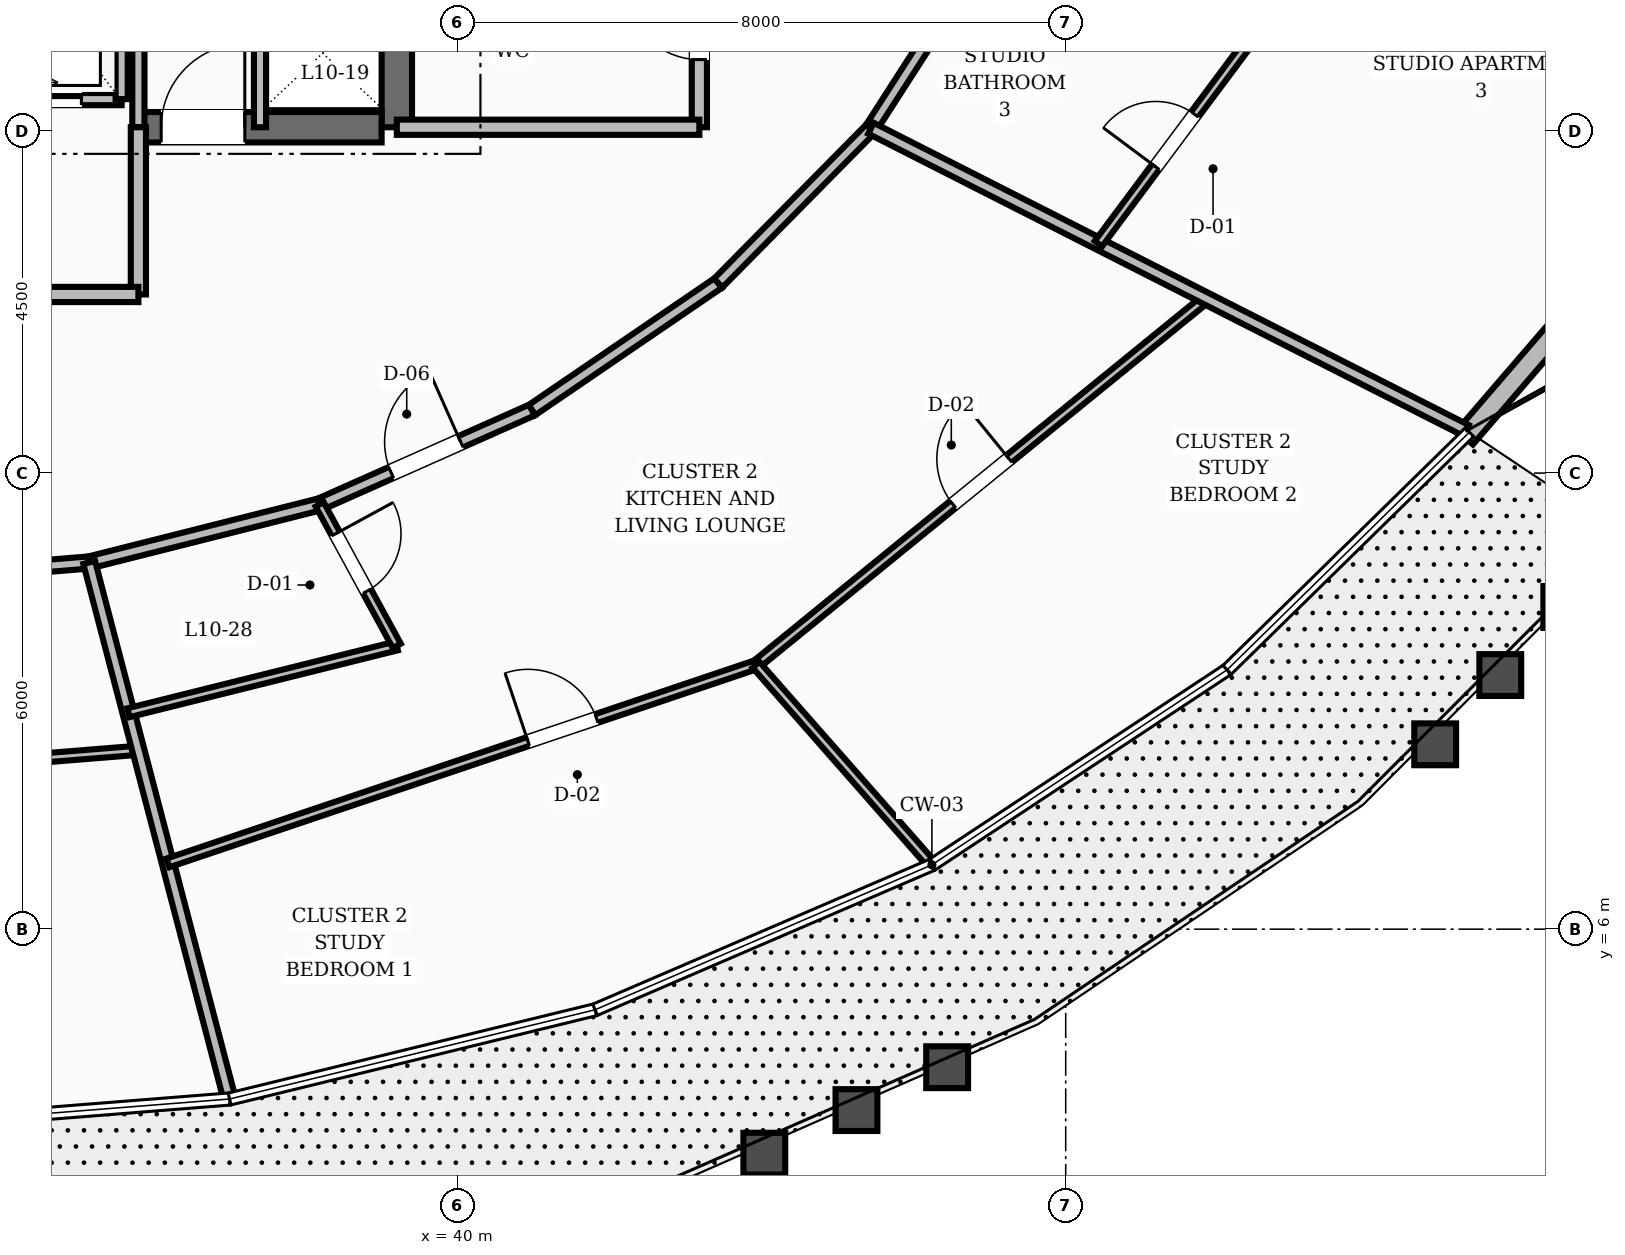
"""IFC4 building model, lengths in metres.
Left out: names, types, materials, properties, quantities, classifications, styles, units other than length and angle.
Written with IfcOpenShell. Run it as: python <this file> out.ifc"""

import sys

from ifc_helpers import new_model, si_unit, direction, frame, frame_2d, origin, place, context, subcontext, project, spatial, rectangle, extrude, element, fill, save


model = new_model("IFC4")
c1 = context("Model", 3, precision=1e-05, world=origin(), true_north=direction((0.0, 1.0)))
c2 = subcontext(c1, "Body", "Model", "MODEL_VIEW")
j1 = project(units=[si_unit("LENGTHUNIT", "METRE"), si_unit("PLANEANGLEUNIT", "RADIAN")], contexts=[c1])
p1 = place(None, origin())
s1 = spatial("IfcSite", under=j1, at=p1, CompositionType="ELEMENT")
p2 = place(p1, origin())
s2 = spatial("IfcBuilding", under=s1, at=p2, CompositionType="ELEMENT")
p3 = place(p2, frame((0.0, 0.0, 44.8)))
s3 = spatial("IfcBuildingStorey", under=s2, at=p3, CompositionType="ELEMENT", Elevation=44.8)
p4 = place(p3, frame((39.2, 16.55, 0.0), z_axis=(0.0, 0.0, 1.0), x_axis=(0.0, 1.0, 0.0)))
e1 = element("IfcWall", 1, at=p4, inside=s3, PredefinedType="SHEAR", context=c2, shape_type="SweptSolid", body=[
    extrude(rectangle(XDim=6.3, YDim=0.4, at=frame_2d((3.15, 0.0))), origin(), (0.0, 0.0, 1.0), 3.6),
])
p5 = place(p3, frame((35.8, 16.55, 0.0), z_axis=(0.0, 0.0, 1.0), x_axis=(1.0, 0.0, 0.0)))
e2 = element("IfcWall", 2, at=p5, inside=s3, PredefinedType="SHEAR", context=c2, shape_type="SweptSolid", body=[
    extrude(rectangle(XDim=3.2, YDim=0.4, at=frame_2d((1.6, 0.0))), origin(), (0.0, 0.0, 1.0), 3.6),
])
p6 = place(p5, frame((0.3, 0.0, 0.0)))
e3 = element("IfcOpeningElement", 3, at=p6, cuts=e2, PredefinedType="OPENING", context=c2, shape_type="SweptSolid", body=[
    extrude(rectangle(XDim=1.1, YDim=2.1, at=frame_2d((0.55, 1.05))), frame((0.0, 0.21, 0.0), z_axis=(0.0, -1.0, 0.0), x_axis=(1.0, 0.0, 0.0)), (0.0, 0.0, 1.0), 0.42),
])
p7 = place(p3, frame((53.251, 12.469, 0.0), z_axis=(0.0, 0.0, 1.0), x_axis=(0.652392900896, 0.757880929211, 0.0)))
e4 = element("IfcWall", 4, at=p7, inside=s3, PredefinedType="STANDARD", context=c2, shape_type="SweptSolid", body=[
    extrude(rectangle(XDim=4.515, YDim=0.28, at=frame_2d((2.258, 0.0))), origin(), (0.0, 0.0, 1.0), 2.65),
])
p8 = place(p3, frame((43.18, 16.55, 0.0), z_axis=(0.0, 0.0, 1.0), x_axis=(0.0, 1.0, 0.0)))
e5 = element("IfcWall", 5, at=p8, inside=s3, PredefinedType="SOLIDWALL", context=c2, shape_type="SweptSolid", body=[
    extrude(rectangle(XDim=2.73, YDim=0.2, at=frame_2d((1.365, 0.0))), origin(), (0.0, 0.0, 1.0), 2.61),
])
p9 = place(p8, frame((0.89, 0.0, 0.0)))
e6 = element("IfcOpeningElement", 6, at=p9, cuts=e5, PredefinedType="OPENING", context=c2, shape_type="SweptSolid", body=[
    extrude(rectangle(XDim=0.95, YDim=2.1, at=frame_2d((0.475, 1.05))), frame((0.0, 0.11, 0.0), z_axis=(0.0, -1.0, 0.0), x_axis=(1.0, 0.0, 0.0)), (0.0, 0.0, 1.0), 0.22),
])
p10 = place(p3, frame((39.2, 16.55, 0.0), z_axis=(0.0, 0.0, 1.0), x_axis=(1.0, 0.0, 0.0)))
e7 = element("IfcWall", 7, at=p10, inside=s3, PredefinedType="SOLIDWALL", context=c2, shape_type="SweptSolid", body=[
    extrude(rectangle(XDim=3.98, YDim=0.2, at=frame_2d((1.99, 0.0))), origin(), (0.0, 0.0, 1.0), 2.61),
])
p11 = place(p3, frame((35.8, 16.55, 0.0), z_axis=(0.0, 0.0, 1.0), x_axis=(0.0, 1.0, 0.0)))
e8 = element("IfcWall", 8, at=p11, inside=s3, PredefinedType="SOLIDWALL", context=c2, shape_type="SweptSolid", body=[
    extrude(rectangle(XDim=3.3, YDim=0.16, at=frame_2d((1.65, 0.0))), origin(), (0.0, 0.0, 1.0), 2.61),
])
p12 = place(p3, frame((37.4, 16.55, 0.0), z_axis=(0.0, 0.0, 1.0), x_axis=(0.0, 1.0, 0.0)))
e9 = element("IfcWall", 9, at=p12, inside=s3, PredefinedType="SOLIDWALL", context=c2, shape_type="SweptSolid", body=[
    extrude(rectangle(XDim=1.75, YDim=0.16, at=frame_2d((0.875, 0.0))), origin(), (0.0, 0.0, 1.0), 2.61),
])
p13 = place(p3, frame((35.8, 14.35, 0.0), z_axis=(0.0, 0.0, 1.0), x_axis=(0.0, 1.0, 0.0)))
e10 = element("IfcWall", 10, at=p13, inside=s3, PredefinedType="SOLIDWALL", context=c2, shape_type="SweptSolid", body=[
    extrude(rectangle(XDim=2.2, YDim=0.2, at=frame_2d((1.1, 0.0))), origin(), (0.0, 0.0, 1.0), 2.61),
])
p14 = place(p3, frame((28.2, 14.35, 0.0), z_axis=(0.0, 0.0, 1.0), x_axis=(1.0, 0.0, 0.0)))
e11 = element("IfcWall", 11, at=p14, inside=s3, PredefinedType="SOLIDWALL", context=c2, shape_type="SweptSolid", body=[
    extrude(rectangle(XDim=7.6, YDim=0.2, at=frame_2d((3.8, 0.0))), origin(), (0.0, 0.0, 1.0), 2.61),
])
p15 = place(p14, frame((3.2, 0.0, 0.0)))
e12 = element("IfcOpeningElement", 12, at=p15, cuts=e11, PredefinedType="OPENING", context=c2, shape_type="SweptSolid", body=[
    extrude(rectangle(XDim=1.2, YDim=2.1, at=frame_2d((0.6, 1.05))), frame((0.0, 0.11, 0.0), z_axis=(0.0, -1.0, 0.0), x_axis=(1.0, 0.0, 0.0)), (0.0, 0.0, 1.0), 0.22),
])
p16 = place(p3, frame((28.42, 16.92, 0.0), z_axis=(0.0, 0.0, 1.0), x_axis=(1.0, 0.0, 0.0)))
e13 = element("IfcWall", 13, at=p16, inside=s3, PredefinedType="SOLIDWALL", context=c2, shape_type="SweptSolid", body=[
    extrude(rectangle(XDim=7.16, YDim=0.16, at=frame_2d((3.58, 0.0))), origin(), (0.0, 0.0, 1.0), 2.61),
])
p17 = place(p16, frame((0.53, 0.0, 0.0)))
e14 = element("IfcOpeningElement", 14, at=p17, cuts=e13, PredefinedType="OPENING", context=c2, shape_type="SweptSolid", body=[
    extrude(rectangle(XDim=1.1, YDim=2.15, at=frame_2d((0.55, 1.075))), frame((0.0, 0.09, 0.0), z_axis=(0.0, -1.0, 0.0), x_axis=(1.0, 0.0, 0.0)), (0.0, 0.0, 1.0), 0.18),
])
p18 = place(p16, frame((3.03, 0.0, 0.0)))
e15 = element("IfcOpeningElement", 15, at=p18, cuts=e13, PredefinedType="OPENING", context=c2, shape_type="SweptSolid", body=[
    extrude(rectangle(XDim=1.1, YDim=2.15, at=frame_2d((0.55, 1.075))), frame((0.0, 0.09, 0.0), z_axis=(0.0, -1.0, 0.0), x_axis=(1.0, 0.0, 0.0)), (0.0, 0.0, 1.0), 0.18),
])
p19 = place(p16, frame((5.53, 0.0, 0.0)))
e16 = element("IfcOpeningElement", 16, at=p19, cuts=e13, PredefinedType="OPENING", context=c2, shape_type="SweptSolid", body=[
    extrude(rectangle(XDim=1.1, YDim=2.15, at=frame_2d((0.55, 1.075))), frame((0.0, 0.09, 0.0), z_axis=(0.0, -1.0, 0.0), x_axis=(1.0, 0.0, 0.0)), (0.0, 0.0, 1.0), 0.18),
])
p20 = place(p3, frame((35.58, 16.92, 0.0), z_axis=(0.0, 0.0, 1.0), x_axis=(0.0, 1.0, 0.0)))
e17 = element("IfcWall", 17, at=p20, inside=s3, PredefinedType="SOLIDWALL", context=c2, shape_type="SweptSolid", body=[
    extrude(rectangle(XDim=2.76, YDim=0.16, at=frame_2d((1.38, 0.0))), origin(), (0.0, 0.0, 1.0), 2.61),
])
p21 = place(p3, frame((32.0, 10.566, 0.0), z_axis=(0.0, 0.0, 1.0), x_axis=(0.996661331307, 0.081646743207, 0.0)))
e18 = element("IfcWall", 18, at=p21, inside=s3, PredefinedType="SOLIDWALL", context=c2, shape_type="SweptSolid", body=[
    extrude(rectangle(XDim=3.164, YDim=0.16, at=frame_2d((1.582, 0.0))), origin(), (0.0, 0.0, 1.0), 2.61),
])
p22 = place(p3, frame((35.153, 10.824, 0.0), z_axis=(0.0, 0.0, 1.0), x_axis=(0.969653665365, 0.244482656326, 0.0)))
e19 = element("IfcWall", 19, at=p22, inside=s3, PredefinedType="SOLIDWALL", context=c2, shape_type="SweptSolid", body=[
    extrude(rectangle(XDim=3.127, YDim=0.16, at=frame_2d((1.563, 0.0))), origin(), (0.0, 0.0, 1.0), 2.61),
])
p23 = place(p3, frame((38.185, 11.589, 0.0), z_axis=(0.0, 0.0, 1.0), x_axis=(0.913860932409, 0.406027334321, 0.0)))
e20 = element("IfcWall", 20, at=p23, inside=s3, PredefinedType="SOLIDWALL", context=c2, shape_type="SweptSolid", body=[
    extrude(rectangle(XDim=3.058, YDim=0.16, at=frame_2d((1.529, 0.0))), origin(), (0.0, 0.0, 1.0), 2.61),
])
p24 = place(p23, frame((1.029, 0.0, 0.0)))
e21 = element("IfcOpeningElement", 21, at=p24, cuts=e20, PredefinedType="OPENING", context=c2, shape_type="SweptSolid", body=[
    extrude(rectangle(XDim=1.0, YDim=2.1, at=frame_2d((0.5, 1.05))), frame((0.0, 0.09, 0.0), z_axis=(0.0, -1.0, 0.0), x_axis=(1.0, 0.0, 0.0)), (0.0, 0.0, 1.0), 0.18),
])
p25 = place(p3, frame((40.979, 12.83, 0.0), z_axis=(0.0, 0.0, 1.0), x_axis=(0.826112340767, 0.563505457323, 0.0)))
e22 = element("IfcWall", 22, at=p25, inside=s3, PredefinedType="SOLIDWALL", context=c2, shape_type="SweptSolid", body=[
    extrude(rectangle(XDim=2.965, YDim=0.16, at=frame_2d((1.482, 0.0))), origin(), (0.0, 0.0, 1.0), 2.61),
])
p26 = place(p3, frame((43.428, 14.501, 0.0), z_axis=(0.0, 0.0, 1.0), x_axis=(0.702569520063, 0.711615113301, 0.0)))
e23 = element("IfcWall", 23, at=p26, inside=s3, PredefinedType="SOLIDWALL", context=c2, shape_type="SweptSolid", body=[
    extrude(rectangle(XDim=2.861, YDim=0.16, at=frame_2d((1.43, 0.0))), origin(), (0.0, 0.0, 1.0), 2.61),
])
p27 = place(p3, frame((45.438, 16.537, 0.0), z_axis=(0.0, 0.0, 1.0), x_axis=(0.540891657444, 0.841092274907, 0.0)))
e24 = element("IfcWall", 24, at=p27, inside=s3, PredefinedType="SOLIDWALL", context=c2, shape_type="SweptSolid", body=[
    extrude(rectangle(XDim=2.761, YDim=0.16, at=frame_2d((1.38, 0.0))), origin(), (0.0, 0.0, 1.0), 2.61),
])
p28 = place(p3, frame((32.0, 8.047, 0.0), z_axis=(0.0, 0.0, 1.0), x_axis=(0.996764368846, 0.080379058209, 0.0)))
e25 = element("IfcWall", 25, at=p28, inside=s3, PredefinedType="PARTITIONING", context=c2, shape_type="SweptSolid", body=[
    extrude(rectangle(XDim=3.812, YDim=0.12, at=frame_2d((1.906, 0.0))), origin(), (0.0, 0.0, 1.0), 2.61),
])
p29 = place(p3, frame((35.153, 10.824, 0.0), z_axis=(0.0, 0.0, 1.0), x_axis=(0.253159702582, -0.967424500924, 0.0)))
e26 = element("IfcWall", 26, at=p29, inside=s3, PredefinedType="SOLIDWALL", context=c2, shape_type="SweptSolid", body=[
    extrude(rectangle(XDim=7.246, YDim=0.16, at=frame_2d((3.623, 0.0))), origin(), (0.0, 0.0, 1.0), 2.61),
])
p30 = place(p3, frame((35.67, 8.848, 0.0), z_axis=(0.0, 0.0, 1.0), x_axis=(0.970347473602, 0.241714253766, 0.0)))
e27 = element("IfcWall", 27, at=p30, inside=s3, PredefinedType="PARTITIONING", context=c2, shape_type="SweptSolid", body=[
    extrude(rectangle(XDim=3.637, YDim=0.12, at=frame_2d((1.819, 0.0))), origin(), (0.0, 0.0, 1.0), 2.61),
])
p31 = place(p3, frame((38.185, 11.589, 0.0), z_axis=(0.0, 0.0, 1.0), x_axis=(0.478529407878, -0.878071526583, 0.0)))
e28 = element("IfcWall", 28, at=p31, inside=s3, PredefinedType="PARTITIONING", context=c2, shape_type="SweptSolid", body=[
    extrude(rectangle(XDim=2.12, YDim=0.12, at=frame_2d((1.06, 0.0))), origin(), (0.0, 0.0, 1.0), 2.61),
])
p32 = place(p31, frame((0.44, 0.0, 0.0)))
e29 = element("IfcOpeningElement", 29, at=p32, cuts=e28, PredefinedType="OPENING", context=c2, shape_type="SweptSolid", body=[
    extrude(rectangle(XDim=0.86, YDim=2.1, at=frame_2d((0.43, 1.05))), frame((0.0, 0.07, 0.0), z_axis=(0.0, -1.0, 0.0), x_axis=(1.0, 0.0, 0.0)), (0.0, 0.0, 1.0), 0.14),
])
p33 = place(p3, frame((36.188, 6.871, 0.0), z_axis=(0.0, 0.0, 1.0), x_axis=(0.947631591079, 0.319365570451, 0.0)))
e30 = element("IfcWall", 30, at=p33, inside=s3, PredefinedType="PARTITIONING", context=c2, shape_type="SweptSolid", body=[
    extrude(rectangle(XDim=8.165, YDim=0.12, at=frame_2d((4.083, 0.0))), origin(), (0.0, 0.0, 1.0), 2.61),
])
p34 = place(p33, frame((5.001, 0.0, 0.0)))
e31 = element("IfcOpeningElement", 31, at=p34, cuts=e30, PredefinedType="OPENING", context=c2, shape_type="SweptSolid", body=[
    extrude(rectangle(XDim=0.95, YDim=2.1, at=frame_2d((0.475, 1.05))), frame((0.0, 0.07, 0.0), z_axis=(0.0, -1.0, 0.0), x_axis=(1.0, 0.0, 0.0)), (0.0, 0.0, 1.0), 0.14),
])
p35 = place(p3, frame((43.925, 9.479, 0.0), z_axis=(0.0, 0.0, 1.0), x_axis=(0.775688329038, 0.631116166957, 0.0)))
e32 = element("IfcWall", 32, at=p35, inside=s3, PredefinedType="PARTITIONING", context=c2, shape_type="SweptSolid", body=[
    extrude(rectangle(XDim=7.635, YDim=0.12, at=frame_2d((3.817, 0.0))), origin(), (0.0, 0.0, 1.0), 2.61),
])
p36 = place(p35, frame((3.342, 0.0, 0.0)))
e33 = element("IfcOpeningElement", 33, at=p36, cuts=e32, PredefinedType="OPENING", context=c2, shape_type="SweptSolid", body=[
    extrude(rectangle(XDim=0.95, YDim=2.1, at=frame_2d((0.475, 1.05))), frame((0.0, 0.07, 0.0), z_axis=(0.0, -1.0, 0.0), x_axis=(1.0, 0.0, 0.0)), (0.0, 0.0, 1.0), 0.14),
])
p37 = place(p3, frame((43.925, 9.479, 0.0), z_axis=(0.0, 0.0, 1.0), x_axis=(0.660293373385, -0.751007763651, 0.0)))
e34 = element("IfcWall", 34, at=p37, inside=s3, PredefinedType="PARTITIONING", context=c2, shape_type="SweptSolid", body=[
    extrude(rectangle(XDim=3.456, YDim=0.12, at=frame_2d((1.728, 0.0))), origin(), (0.0, 0.0, 1.0), 2.61),
])
p38 = place(p3, frame((45.438, 16.537, 0.0), z_axis=(0.0, 0.0, 1.0), x_axis=(0.891601143044, -0.452821600327, 0.0)))
e35 = element("IfcWall", 35, at=p38, inside=s3, PredefinedType="SOLIDWALL", context=c2, shape_type="SweptSolid", body=[
    extrude(rectangle(XDim=8.78, YDim=0.16, at=frame_2d((4.39, 0.0))), origin(), (0.0, 0.0, 1.0), 2.61),
])
p39 = place(p3, frame((48.43, 15.017, 0.0), z_axis=(0.0, 0.0, 1.0), x_axis=(0.597596813452, 0.801796762623, 0.0)))
e36 = element("IfcWall", 36, at=p39, inside=s3, PredefinedType="PARTITIONING", context=c2, shape_type="SweptSolid", body=[
    extrude(rectangle(XDim=3.385, YDim=0.12, at=frame_2d((1.692, 0.0))), origin(), (0.0, 0.0, 1.0), 2.61),
])
p40 = place(p39, frame((1.262, 0.0, 0.0)))
e37 = element("IfcOpeningElement", 37, at=p40, cuts=e36, PredefinedType="OPENING", context=c2, shape_type="SweptSolid", body=[
    extrude(rectangle(XDim=0.86, YDim=2.1, at=frame_2d((0.43, 1.05))), frame((0.0, 0.07, 0.0), z_axis=(0.0, -1.0, 0.0), x_axis=(1.0, 0.0, 0.0)), (0.0, 0.0, 1.0), 0.14),
])
p41 = place(p9, origin())
e38 = element("IfcDoor", 38, at=p41, inside=s3, OperationType="SINGLE_SWING_RIGHT", PredefinedType="DOOR", context=c2, shape_type="SweptSolid", body=[
    extrude(rectangle(XDim=0.95, YDim=2.1, at=frame_2d((0.475, 1.05))), frame((0.0, 0.025, 0.0), z_axis=(0.0, -1.0, 0.0), x_axis=(1.0, 0.0, 0.0)), (0.0, 0.0, 1.0), 0.05),
])
fill(e6, e38)
p42 = place(p6, origin())
e39 = element("IfcDoor", 39, at=p42, inside=s3, OperationType="SINGLE_SWING_RIGHT", PredefinedType="DOOR", context=c2, shape_type="SweptSolid", body=[
    extrude(rectangle(XDim=1.1, YDim=2.1, at=frame_2d((0.55, 1.05))), frame((0.0, 0.025, 0.0), z_axis=(0.0, -1.0, 0.0), x_axis=(1.0, 0.0, 0.0)), (0.0, 0.0, 1.0), 0.05),
])
fill(e3, e39)
p43 = place(p19, origin())
e40 = element("IfcDoor", 40, at=p43, inside=s3, OperationType="SLIDING_TO_RIGHT", PredefinedType="DOOR", context=c2, shape_type="SweptSolid", body=[
    extrude(rectangle(XDim=1.1, YDim=2.15, at=frame_2d((0.55, 1.075))), frame((0.0, 0.025, 0.0), z_axis=(0.0, -1.0, 0.0), x_axis=(1.0, 0.0, 0.0)), (0.0, 0.0, 1.0), 0.05),
])
fill(e16, e40)
p44 = place(p32, origin())
e41 = element("IfcDoor", 41, at=p44, inside=s3, OperationType="SINGLE_SWING_LEFT", PredefinedType="DOOR", context=c2, shape_type="SweptSolid", body=[
    extrude(rectangle(XDim=0.86, YDim=2.1, at=frame_2d((0.43, 1.05))), frame((0.0, 0.025, 0.0), z_axis=(0.0, -1.0, 0.0), x_axis=(1.0, 0.0, 0.0)), (0.0, 0.0, 1.0), 0.05),
])
fill(e29, e41)
p45 = place(p24, origin())
e42 = element("IfcDoor", 42, at=p45, inside=s3, OperationType="SINGLE_SWING_RIGHT", PredefinedType="DOOR", context=c2, shape_type="SweptSolid", body=[
    extrude(rectangle(XDim=1.0, YDim=2.1, at=frame_2d((0.5, 1.05))), frame((0.0, 0.025, 0.0), z_axis=(0.0, -1.0, 0.0), x_axis=(1.0, 0.0, 0.0)), (0.0, 0.0, 1.0), 0.05),
])
fill(e21, e42)
p46 = place(p34, origin())
e43 = element("IfcDoor", 43, at=p46, inside=s3, OperationType="SINGLE_SWING_LEFT", PredefinedType="DOOR", context=c2, shape_type="SweptSolid", body=[
    extrude(rectangle(XDim=0.95, YDim=2.1, at=frame_2d((0.475, 1.05))), frame((0.0, 0.025, 0.0), z_axis=(0.0, -1.0, 0.0), x_axis=(1.0, 0.0, 0.0)), (0.0, 0.0, 1.0), 0.05),
])
fill(e31, e43)
p47 = place(p36, origin())
e44 = element("IfcDoor", 44, at=p47, inside=s3, OperationType="SINGLE_SWING_RIGHT", PredefinedType="DOOR", context=c2, shape_type="SweptSolid", body=[
    extrude(rectangle(XDim=0.95, YDim=2.1, at=frame_2d((0.475, 1.05))), frame((0.0, 0.025, 0.0), z_axis=(0.0, -1.0, 0.0), x_axis=(1.0, 0.0, 0.0)), (0.0, 0.0, 1.0), 0.05),
])
fill(e33, e44)
p48 = place(p40, origin())
e45 = element("IfcDoor", 45, at=p48, inside=s3, OperationType="SINGLE_SWING_LEFT", PredefinedType="DOOR", context=c2, shape_type="SweptSolid", body=[
    extrude(rectangle(XDim=0.86, YDim=2.1, at=frame_2d((0.43, 1.05))), frame((0.0, 0.025, 0.0), z_axis=(0.0, -1.0, 0.0), x_axis=(1.0, 0.0, 0.0)), (0.0, 0.0, 1.0), 0.05),
])
fill(e37, e45)
save(model, sys.argv[1])
